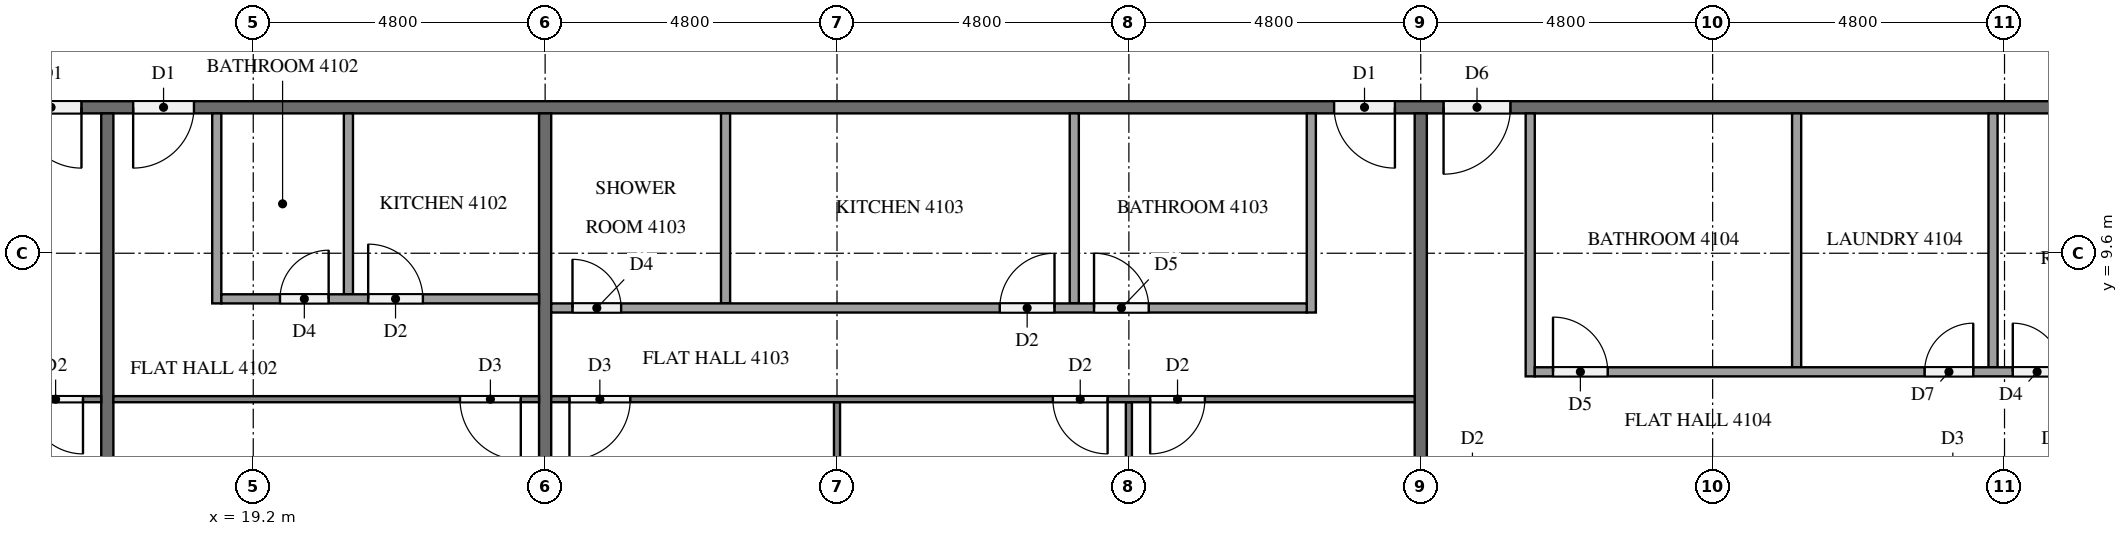
"""IFC4 building model, lengths in metres.
Left out: names, types, materials, properties, quantities, classifications, styles, units other than length and angle.
Written with IfcOpenShell. Run it as: python <this file> out.ifc"""

import sys

from ifc_helpers import new_model, si_unit, direction, frame, frame_2d, origin, place, context, subcontext, project, spatial, rectangle, extrude, element, fill, save


model = new_model("IFC4")
c1 = context("Model", 3, precision=1e-05, world=origin(), true_north=direction((0.0, 1.0)))
c2 = subcontext(c1, "Body", "Model", "MODEL_VIEW")
j1 = project(units=[si_unit("LENGTHUNIT", "METRE"), si_unit("PLANEANGLEUNIT", "RADIAN")], contexts=[c1])
p1 = place(None, origin())
s1 = spatial("IfcSite", under=j1, at=p1, CompositionType="ELEMENT")
p2 = place(p1, origin())
s2 = spatial("IfcBuilding", under=s1, at=p2, CompositionType="ELEMENT")
p3 = place(p2, frame((0.0, 0.0, 159.5)))
s3 = spatial("IfcBuildingStorey", under=s2, at=p3, CompositionType="ELEMENT", Elevation=159.5)
p4 = place(p3, frame((50.5, 12.0, 0.0), z_axis=(0.0, 0.0, 1.0), x_axis=(-1.0, 0.0, 0.0)))
e1 = element("IfcWall", 1, at=p4, inside=s3, PredefinedType="PARTITIONING", context=c2, shape_type="SweptSolid", body=[
    extrude(rectangle(XDim=38.6, YDim=0.2, at=frame_2d((19.3, 0.0))), origin(), (0.0, 0.0, 1.0), 3.2),
])
p5 = place(p4, frame((34.125, 0.0, 0.0)))
e2 = element("IfcOpeningElement", 2, at=p5, cuts=e1, PredefinedType="OPENING", context=c2, shape_type="SweptSolid", body=[
    extrude(rectangle(XDim=1.0, YDim=2.1, at=frame_2d((0.5, 1.05))), frame((0.0, 0.11, 0.0), z_axis=(0.0, -1.0, 0.0), x_axis=(1.0, 0.0, 0.0)), (0.0, 0.0, 1.0), 0.22),
])
p6 = place(p4, frame((32.275, 0.0, 0.0)))
e3 = element("IfcOpeningElement", 3, at=p6, cuts=e1, PredefinedType="OPENING", context=c2, shape_type="SweptSolid", body=[
    extrude(rectangle(XDim=1.0, YDim=2.1, at=frame_2d((0.5, 1.05))), frame((0.0, 0.11, 0.0), z_axis=(0.0, -1.0, 0.0), x_axis=(1.0, 0.0, 0.0)), (0.0, 0.0, 1.0), 0.22),
])
p7 = place(p4, frame((12.525, 0.0, 0.0)))
e4 = element("IfcOpeningElement", 4, at=p7, cuts=e1, PredefinedType="OPENING", context=c2, shape_type="SweptSolid", body=[
    extrude(rectangle(XDim=1.0, YDim=2.1, at=frame_2d((0.5, 1.05))), frame((0.0, 0.11, 0.0), z_axis=(0.0, -1.0, 0.0), x_axis=(1.0, 0.0, 0.0)), (0.0, 0.0, 1.0), 0.22),
])
p8 = place(p4, frame((10.625, 0.0, 0.0)))
e5 = element("IfcOpeningElement", 5, at=p8, cuts=e1, PredefinedType="OPENING", context=c2, shape_type="SweptSolid", body=[
    extrude(rectangle(XDim=1.1, YDim=2.1, at=frame_2d((0.55, 1.05))), frame((0.0, 0.11, 0.0), z_axis=(0.0, -1.0, 0.0), x_axis=(1.0, 0.0, 0.0)), (0.0, 0.0, 1.0), 0.22),
])
p9 = place(p3, frame((16.8, 11.9, 0.0), z_axis=(0.0, 0.0, 1.0), x_axis=(0.0, -1.0, 0.0)))
e6 = element("IfcWall", 6, at=p9, inside=s3, PredefinedType="PARTITIONING", context=c2, shape_type="SweptSolid", body=[
    extrude(rectangle(XDim=11.8, YDim=0.2, at=frame_2d((5.9, 0.0))), origin(), (0.0, 0.0, 1.0), 3.2),
])
p10 = place(p3, frame((24.0, 11.9, 0.0), z_axis=(0.0, 0.0, 1.0), x_axis=(0.0, -1.0, 0.0)))
e7 = element("IfcWall", 7, at=p10, inside=s3, PredefinedType="PARTITIONING", context=c2, shape_type="SweptSolid", body=[
    extrude(rectangle(XDim=11.525, YDim=0.2, at=frame_2d((5.762, 0.0))), origin(), (0.0, 0.0, 1.0), 3.2),
])
p11 = place(p3, frame((38.4, 11.9, 0.0), z_axis=(0.0, 0.0, 1.0), x_axis=(0.0, -1.0, 0.0)))
e8 = element("IfcWall", 8, at=p11, inside=s3, PredefinedType="PARTITIONING", context=c2, shape_type="SweptSolid", body=[
    extrude(rectangle(XDim=11.8, YDim=0.2, at=frame_2d((5.9, 0.0))), origin(), (0.0, 0.0, 1.0), 3.2),
])
p12 = place(p3, frame((16.7, 7.2, 0.0), z_axis=(0.0, 0.0, 1.0), x_axis=(-1.0, 0.0, 0.0)))
e9 = element("IfcWall", 9, at=p12, inside=s3, PredefinedType="PARTITIONING", context=c2, shape_type="SweptSolid", body=[
    extrude(rectangle(XDim=16.6, YDim=0.1, at=frame_2d((8.3, 0.0))), origin(), (0.0, 0.0, 1.0), 3.2),
])
p13 = place(p12, frame((0.3, 0.0, 0.0)))
e10 = element("IfcOpeningElement", 10, at=p13, cuts=e9, PredefinedType="OPENING", context=c2, shape_type="SweptSolid", body=[
    extrude(rectangle(XDim=0.9, YDim=2.1, at=frame_2d((0.45, 1.05))), frame((0.0, 0.06, 0.0), z_axis=(0.0, -1.0, 0.0), x_axis=(1.0, 0.0, 0.0)), (0.0, 0.0, 1.0), 0.12),
])
p14 = place(p12, frame((10.55, 0.0, 0.0)))
e11 = element("IfcOpeningElement", 11, at=p14, cuts=e9, PredefinedType="OPENING", context=c2, shape_type="SweptSolid", body=[
    extrude(rectangle(XDim=1.0, YDim=2.1, at=frame_2d((0.5, 1.05))), frame((0.0, 0.06, 0.0), z_axis=(0.0, -1.0, 0.0), x_axis=(1.0, 0.0, 0.0)), (0.0, 0.0, 1.0), 0.12),
])
p15 = place(p12, frame((12.25, 0.0, 0.0)))
e12 = element("IfcOpeningElement", 12, at=p15, cuts=e9, PredefinedType="OPENING", context=c2, shape_type="SweptSolid", body=[
    extrude(rectangle(XDim=0.9, YDim=2.1, at=frame_2d((0.45, 1.05))), frame((0.0, 0.06, 0.0), z_axis=(0.0, -1.0, 0.0), x_axis=(1.0, 0.0, 0.0)), (0.0, 0.0, 1.0), 0.12),
])
p16 = place(p3, frame((23.9, 7.2, 0.0), z_axis=(0.0, 0.0, 1.0), x_axis=(-1.0, 0.0, 0.0)))
e13 = element("IfcWall", 13, at=p16, inside=s3, PredefinedType="PARTITIONING", context=c2, shape_type="SweptSolid", body=[
    extrude(rectangle(XDim=7.0, YDim=0.1, at=frame_2d((3.5, 0.0))), origin(), (0.0, 0.0, 1.0), 3.2),
])
p17 = place(p16, frame((0.3, 0.0, 0.0)))
e14 = element("IfcOpeningElement", 14, at=p17, cuts=e13, PredefinedType="OPENING", context=c2, shape_type="SweptSolid", body=[
    extrude(rectangle(XDim=1.0, YDim=2.1, at=frame_2d((0.5, 1.05))), frame((0.0, 0.06, 0.0), z_axis=(0.0, -1.0, 0.0), x_axis=(1.0, 0.0, 0.0)), (0.0, 0.0, 1.0), 0.12),
])
p18 = place(p3, frame((20.765, 11.9, 0.0), z_axis=(0.0, 0.0, 1.0), x_axis=(0.0, -1.0, 0.0)))
e15 = element("IfcWall", 15, at=p18, inside=s3, PredefinedType="PARTITIONING", context=c2, shape_type="SweptSolid", body=[
    extrude(rectangle(XDim=2.975, YDim=0.15, at=frame_2d((1.487, 0.0))), origin(), (0.0, 0.0, 1.0), 3.2),
])
p19 = place(p3, frame((18.6, 11.9, 0.0), z_axis=(0.0, 0.0, 1.0), x_axis=(0.0, -1.0, 0.0)))
e16 = element("IfcWall", 16, at=p19, inside=s3, PredefinedType="PARTITIONING", context=c2, shape_type="SweptSolid", body=[
    extrude(rectangle(XDim=3.125, YDim=0.15, at=frame_2d((1.562, 0.0))), origin(), (0.0, 0.0, 1.0), 3.2),
])
p20 = place(p3, frame((18.675, 8.85, 0.0), z_axis=(0.0, 0.0, 1.0), x_axis=(1.0, 0.0, 0.0)))
e17 = element("IfcWall", 17, at=p20, inside=s3, PredefinedType="PARTITIONING", context=c2, shape_type="SweptSolid", body=[
    extrude(rectangle(XDim=5.225, YDim=0.15, at=frame_2d((2.612, 0.0))), origin(), (0.0, 0.0, 1.0), 3.2),
])
p21 = place(p20, frame((0.965, 0.0, 0.0)))
e18 = element("IfcOpeningElement", 18, at=p21, cuts=e17, PredefinedType="OPENING", context=c2, shape_type="SweptSolid", body=[
    extrude(rectangle(XDim=0.8, YDim=2.1, at=frame_2d((0.4, 1.05))), frame((0.0, 0.085, 0.0), z_axis=(0.0, -1.0, 0.0), x_axis=(1.0, 0.0, 0.0)), (0.0, 0.0, 1.0), 0.17),
])
p22 = place(p20, frame((2.415, 0.0, 0.0)))
e19 = element("IfcOpeningElement", 19, at=p22, cuts=e17, PredefinedType="OPENING", context=c2, shape_type="SweptSolid", body=[
    extrude(rectangle(XDim=0.9, YDim=2.1, at=frame_2d((0.45, 1.05))), frame((0.0, 0.085, 0.0), z_axis=(0.0, -1.0, 0.0), x_axis=(1.0, 0.0, 0.0)), (0.0, 0.0, 1.0), 0.17),
])
p23 = place(p3, frame((33.6, 7.15, 0.0), z_axis=(0.0, 0.0, 1.0), x_axis=(0.0, -1.0, 0.0)))
e20 = element("IfcWall", 20, at=p23, inside=s3, PredefinedType="PARTITIONING", context=c2, shape_type="SweptSolid", body=[
    extrude(rectangle(XDim=6.775, YDim=0.1, at=frame_2d((3.387, 0.0))), origin(), (0.0, 0.0, 1.0), 3.2),
])
p24 = place(p3, frame((28.8, 7.15, 0.0), z_axis=(0.0, 0.0, 1.0), x_axis=(0.0, -1.0, 0.0)))
e21 = element("IfcWall", 21, at=p24, inside=s3, PredefinedType="PARTITIONING", context=c2, shape_type="SweptSolid", body=[
    extrude(rectangle(XDim=7.05, YDim=0.1, at=frame_2d((3.525, 0.0))), origin(), (0.0, 0.0, 1.0), 3.2),
])
p25 = place(p3, frame((38.3, 7.2, 0.0), z_axis=(0.0, 0.0, 1.0), x_axis=(-1.0, 0.0, 0.0)))
e22 = element("IfcWall", 22, at=p25, inside=s3, PredefinedType="PARTITIONING", context=c2, shape_type="SweptSolid", body=[
    extrude(rectangle(XDim=14.2, YDim=0.1, at=frame_2d((7.1, 0.0))), origin(), (0.0, 0.0, 1.0), 3.2),
])
p26 = place(p25, frame((3.45, 0.0, 0.0)))
e23 = element("IfcOpeningElement", 23, at=p26, cuts=e22, PredefinedType="OPENING", context=c2, shape_type="SweptSolid", body=[
    extrude(rectangle(XDim=0.9, YDim=2.1, at=frame_2d((0.45, 1.05))), frame((0.0, 0.06, 0.0), z_axis=(0.0, -1.0, 0.0), x_axis=(1.0, 0.0, 0.0)), (0.0, 0.0, 1.0), 0.12),
])
p27 = place(p25, frame((5.05, 0.0, 0.0)))
e24 = element("IfcOpeningElement", 24, at=p27, cuts=e22, PredefinedType="OPENING", context=c2, shape_type="SweptSolid", body=[
    extrude(rectangle(XDim=0.9, YDim=2.1, at=frame_2d((0.45, 1.05))), frame((0.0, 0.06, 0.0), z_axis=(0.0, -1.0, 0.0), x_axis=(1.0, 0.0, 0.0)), (0.0, 0.0, 1.0), 0.12),
])
p28 = place(p25, frame((12.9, 0.0, 0.0)))
e25 = element("IfcOpeningElement", 25, at=p28, cuts=e22, PredefinedType="OPENING", context=c2, shape_type="SweptSolid", body=[
    extrude(rectangle(XDim=1.0, YDim=2.1, at=frame_2d((0.5, 1.05))), frame((0.0, 0.06, 0.0), z_axis=(0.0, -1.0, 0.0), x_axis=(1.0, 0.0, 0.0)), (0.0, 0.0, 1.0), 0.12),
])
for number, where, z_axis, x_axis in (
    (26, (32.702, 11.9, 0.0), (0.0, 0.0, 1.0), (0.0, -1.0, 0.0)),
    (27, (26.967, 11.9, 0.0), (0.0, 0.0, 1.0), (0.0, -1.0, 0.0)),
):
    element("IfcWall", number, at=place(p3, frame(where, z_axis=z_axis, x_axis=x_axis)), inside=s3, PredefinedType="PARTITIONING", context=c2, shape_type="SweptSolid", body=[
        extrude(rectangle(XDim=3.125, YDim=0.15, at=frame_2d((1.562, 0.0))), origin(), (0.0, 0.0, 1.0), 3.2),
    ])
p29 = place(p3, frame((36.6, 11.9, 0.0), z_axis=(0.0, 0.0, 1.0), x_axis=(0.0, -1.0, 0.0)))
e28 = element("IfcWall", 28, at=p29, inside=s3, PredefinedType="PARTITIONING", context=c2, shape_type="SweptSolid", body=[
    extrude(rectangle(XDim=3.275, YDim=0.15, at=frame_2d((1.637, 0.0))), origin(), (0.0, 0.0, 1.0), 3.2),
])
p30 = place(p3, frame((24.1, 8.7, 0.0), z_axis=(0.0, 0.0, 1.0), x_axis=(1.0, 0.0, 0.0)))
e29 = element("IfcWall", 29, at=p30, inside=s3, PredefinedType="PARTITIONING", context=c2, shape_type="SweptSolid", body=[
    extrude(rectangle(XDim=12.425, YDim=0.15, at=frame_2d((6.212, 0.0))), origin(), (0.0, 0.0, 1.0), 3.2),
])
p31 = place(p30, frame((8.927, 0.0, 0.0)))
e30 = element("IfcOpeningElement", 30, at=p31, cuts=e29, PredefinedType="OPENING", context=c2, shape_type="SweptSolid", body=[
    extrude(rectangle(XDim=0.9, YDim=2.1, at=frame_2d((0.45, 1.05))), frame((0.0, 0.085, 0.0), z_axis=(0.0, -1.0, 0.0), x_axis=(1.0, 0.0, 0.0)), (0.0, 0.0, 1.0), 0.17),
])
p32 = place(p30, frame((7.377, 0.0, 0.0)))
e31 = element("IfcOpeningElement", 31, at=p32, cuts=e29, PredefinedType="OPENING", context=c2, shape_type="SweptSolid", body=[
    extrude(rectangle(XDim=0.9, YDim=2.1, at=frame_2d((0.45, 1.05))), frame((0.0, 0.085, 0.0), z_axis=(0.0, -1.0, 0.0), x_axis=(1.0, 0.0, 0.0)), (0.0, 0.0, 1.0), 0.17),
])
p33 = place(p30, frame((0.35, 0.0, 0.0)))
e32 = element("IfcOpeningElement", 32, at=p33, cuts=e29, PredefinedType="OPENING", context=c2, shape_type="SweptSolid", body=[
    extrude(rectangle(XDim=0.8, YDim=2.1, at=frame_2d((0.4, 1.05))), frame((0.0, 0.085, 0.0), z_axis=(0.0, -1.0, 0.0), x_axis=(1.0, 0.0, 0.0)), (0.0, 0.0, 1.0), 0.17),
])
for number, where, z_axis, x_axis in (
    (33, (44.581, 11.9, 0.0), (0.0, 0.0, 1.0), (0.0, -1.0, 0.0)),
    (34, (47.811, 11.9, 0.0), (0.0, 0.0, 1.0), (0.0, -1.0, 0.0)),
):
    element("IfcWall", number, at=place(p3, frame(where, z_axis=z_axis, x_axis=x_axis)), inside=s3, PredefinedType="PARTITIONING", context=c2, shape_type="SweptSolid", body=[
        extrude(rectangle(XDim=4.175, YDim=0.15, at=frame_2d((2.087, 0.0))), origin(), (0.0, 0.0, 1.0), 3.2),
    ])
p34 = place(p3, frame((40.2, 11.9, 0.0), z_axis=(0.0, 0.0, 1.0), x_axis=(0.0, -1.0, 0.0)))
e35 = element("IfcWall", 35, at=p34, inside=s3, PredefinedType="PARTITIONING", context=c2, shape_type="SweptSolid", body=[
    extrude(rectangle(XDim=4.325, YDim=0.15, at=frame_2d((2.163, 0.0))), origin(), (0.0, 0.0, 1.0), 3.2),
])
p35 = place(p3, frame((40.275, 7.65, 0.0), z_axis=(0.0, 0.0, 1.0), x_axis=(1.0, 0.0, 0.0)))
e36 = element("IfcWall", 36, at=p35, inside=s3, PredefinedType="PARTITIONING", context=c2, shape_type="SweptSolid", body=[
    extrude(rectangle(XDim=17.225, YDim=0.15, at=frame_2d((8.613, 0.0))), origin(), (0.0, 0.0, 1.0), 3.2),
])
p36 = place(p35, frame((0.3, 0.0, 0.0)))
e37 = element("IfcOpeningElement", 37, at=p36, cuts=e36, PredefinedType="OPENING", context=c2, shape_type="SweptSolid", body=[
    extrude(rectangle(XDim=0.9, YDim=2.1, at=frame_2d((0.45, 1.05))), frame((0.0, 0.085, 0.0), z_axis=(0.0, -1.0, 0.0), x_axis=(1.0, 0.0, 0.0)), (0.0, 0.0, 1.0), 0.17),
])
p37 = place(p35, frame((6.411, 0.0, 0.0)))
e38 = element("IfcOpeningElement", 38, at=p37, cuts=e36, PredefinedType="OPENING", context=c2, shape_type="SweptSolid", body=[
    extrude(rectangle(XDim=0.8, YDim=2.1, at=frame_2d((0.4, 1.05))), frame((0.0, 0.085, 0.0), z_axis=(0.0, -1.0, 0.0), x_axis=(1.0, 0.0, 0.0)), (0.0, 0.0, 1.0), 0.17),
])
p38 = place(p35, frame((7.861, 0.0, 0.0)))
e39 = element("IfcOpeningElement", 39, at=p38, cuts=e36, PredefinedType="OPENING", context=c2, shape_type="SweptSolid", body=[
    extrude(rectangle(XDim=0.8, YDim=2.1, at=frame_2d((0.4, 1.05))), frame((0.0, 0.085, 0.0), z_axis=(0.0, -1.0, 0.0), x_axis=(1.0, 0.0, 0.0)), (0.0, 0.0, 1.0), 0.17),
])
p39 = place(p35, frame((15.975, 0.0, 0.0)))
e40 = element("IfcOpeningElement", 40, at=p39, cuts=e36, PredefinedType="OPENING", context=c2, shape_type="SweptSolid", body=[
    extrude(rectangle(XDim=0.9, YDim=2.1, at=frame_2d((0.45, 1.05))), frame((0.0, 0.085, 0.0), z_axis=(0.0, -1.0, 0.0), x_axis=(1.0, 0.0, 0.0)), (0.0, 0.0, 1.0), 0.17),
])
p40 = place(p5, origin())
e41 = element("IfcDoor", 41, at=p40, inside=s3, OperationType="SINGLE_SWING_LEFT", PredefinedType="DOOR", context=c2, shape_type="SweptSolid", body=[
    extrude(rectangle(XDim=1.0, YDim=2.1, at=frame_2d((0.5, 1.05))), frame((0.0, 0.025, 0.0), z_axis=(0.0, -1.0, 0.0), x_axis=(1.0, 0.0, 0.0)), (0.0, 0.0, 1.0), 0.05),
])
fill(e2, e41)
p41 = place(p6, origin())
e42 = element("IfcDoor", 42, at=p41, inside=s3, OperationType="SINGLE_SWING_RIGHT", PredefinedType="DOOR", context=c2, shape_type="SweptSolid", body=[
    extrude(rectangle(XDim=1.0, YDim=2.1, at=frame_2d((0.5, 1.05))), frame((0.0, 0.025, 0.0), z_axis=(0.0, -1.0, 0.0), x_axis=(1.0, 0.0, 0.0)), (0.0, 0.0, 1.0), 0.05),
])
fill(e3, e42)
p42 = place(p7, origin())
e43 = element("IfcDoor", 43, at=p42, inside=s3, OperationType="SINGLE_SWING_LEFT", PredefinedType="DOOR", context=c2, shape_type="SweptSolid", body=[
    extrude(rectangle(XDim=1.0, YDim=2.1, at=frame_2d((0.5, 1.05))), frame((0.0, 0.025, 0.0), z_axis=(0.0, -1.0, 0.0), x_axis=(1.0, 0.0, 0.0)), (0.0, 0.0, 1.0), 0.05),
])
fill(e4, e43)
p43 = place(p8, origin())
e44 = element("IfcDoor", 44, at=p43, inside=s3, OperationType="SINGLE_SWING_RIGHT", PredefinedType="DOOR", context=c2, shape_type="SweptSolid", body=[
    extrude(rectangle(XDim=1.1, YDim=2.1, at=frame_2d((0.55, 1.05))), frame((0.0, 0.025, 0.0), z_axis=(0.0, -1.0, 0.0), x_axis=(1.0, 0.0, 0.0)), (0.0, 0.0, 1.0), 0.05),
])
fill(e5, e44)
p44 = place(p13, origin())
e45 = element("IfcDoor", 45, at=p44, inside=s3, OperationType="SINGLE_SWING_LEFT", PredefinedType="DOOR", context=c2, shape_type="SweptSolid", body=[
    extrude(rectangle(XDim=0.9, YDim=2.1, at=frame_2d((0.45, 1.05))), frame((0.0, 0.025, 0.0), z_axis=(0.0, -1.0, 0.0), x_axis=(1.0, 0.0, 0.0)), (0.0, 0.0, 1.0), 0.05),
])
fill(e10, e45)
p45 = place(p17, origin())
e46 = element("IfcDoor", 46, at=p45, inside=s3, OperationType="SINGLE_SWING_LEFT", PredefinedType="DOOR", context=c2, shape_type="SweptSolid", body=[
    extrude(rectangle(XDim=1.0, YDim=2.1, at=frame_2d((0.5, 1.05))), frame((0.0, 0.025, 0.0), z_axis=(0.0, -1.0, 0.0), x_axis=(1.0, 0.0, 0.0)), (0.0, 0.0, 1.0), 0.05),
])
fill(e14, e46)
p46 = place(p21, origin())
e47 = element("IfcDoor", 47, at=p46, inside=s3, OperationType="SINGLE_SWING_RIGHT", PredefinedType="DOOR", context=c2, shape_type="SweptSolid", body=[
    extrude(rectangle(XDim=0.8, YDim=2.1, at=frame_2d((0.4, 1.05))), frame((0.0, 0.025, 0.0), z_axis=(0.0, -1.0, 0.0), x_axis=(1.0, 0.0, 0.0)), (0.0, 0.0, 1.0), 0.05),
])
fill(e18, e47)
p47 = place(p22, origin())
e48 = element("IfcDoor", 48, at=p47, inside=s3, OperationType="SINGLE_SWING_LEFT", PredefinedType="DOOR", context=c2, shape_type="SweptSolid", body=[
    extrude(rectangle(XDim=0.9, YDim=2.1, at=frame_2d((0.45, 1.05))), frame((0.0, 0.025, 0.0), z_axis=(0.0, -1.0, 0.0), x_axis=(1.0, 0.0, 0.0)), (0.0, 0.0, 1.0), 0.05),
])
fill(e19, e48)
p48 = place(p26, origin())
e49 = element("IfcDoor", 49, at=p48, inside=s3, OperationType="SINGLE_SWING_RIGHT", PredefinedType="DOOR", context=c2, shape_type="SweptSolid", body=[
    extrude(rectangle(XDim=0.9, YDim=2.1, at=frame_2d((0.45, 1.05))), frame((0.0, 0.025, 0.0), z_axis=(0.0, -1.0, 0.0), x_axis=(1.0, 0.0, 0.0)), (0.0, 0.0, 1.0), 0.05),
])
fill(e23, e49)
p49 = place(p27, origin())
e50 = element("IfcDoor", 50, at=p49, inside=s3, OperationType="SINGLE_SWING_LEFT", PredefinedType="DOOR", context=c2, shape_type="SweptSolid", body=[
    extrude(rectangle(XDim=0.9, YDim=2.1, at=frame_2d((0.45, 1.05))), frame((0.0, 0.025, 0.0), z_axis=(0.0, -1.0, 0.0), x_axis=(1.0, 0.0, 0.0)), (0.0, 0.0, 1.0), 0.05),
])
fill(e24, e50)
p50 = place(p28, origin())
e51 = element("IfcDoor", 51, at=p50, inside=s3, OperationType="SINGLE_SWING_RIGHT", PredefinedType="DOOR", context=c2, shape_type="SweptSolid", body=[
    extrude(rectangle(XDim=1.0, YDim=2.1, at=frame_2d((0.5, 1.05))), frame((0.0, 0.025, 0.0), z_axis=(0.0, -1.0, 0.0), x_axis=(1.0, 0.0, 0.0)), (0.0, 0.0, 1.0), 0.05),
])
fill(e25, e51)
p51 = place(p31, origin())
e52 = element("IfcDoor", 52, at=p51, inside=s3, OperationType="SINGLE_SWING_LEFT", PredefinedType="DOOR", context=c2, shape_type="SweptSolid", body=[
    extrude(rectangle(XDim=0.9, YDim=2.1, at=frame_2d((0.45, 1.05))), frame((0.0, 0.025, 0.0), z_axis=(0.0, -1.0, 0.0), x_axis=(1.0, 0.0, 0.0)), (0.0, 0.0, 1.0), 0.05),
])
fill(e30, e52)
p52 = place(p32, origin())
e53 = element("IfcDoor", 53, at=p52, inside=s3, OperationType="SINGLE_SWING_RIGHT", PredefinedType="DOOR", context=c2, shape_type="SweptSolid", body=[
    extrude(rectangle(XDim=0.9, YDim=2.1, at=frame_2d((0.45, 1.05))), frame((0.0, 0.025, 0.0), z_axis=(0.0, -1.0, 0.0), x_axis=(1.0, 0.0, 0.0)), (0.0, 0.0, 1.0), 0.05),
])
fill(e31, e53)
p53 = place(p33, origin())
e54 = element("IfcDoor", 54, at=p53, inside=s3, OperationType="SINGLE_SWING_LEFT", PredefinedType="DOOR", context=c2, shape_type="SweptSolid", body=[
    extrude(rectangle(XDim=0.8, YDim=2.1, at=frame_2d((0.4, 1.05))), frame((0.0, 0.025, 0.0), z_axis=(0.0, -1.0, 0.0), x_axis=(1.0, 0.0, 0.0)), (0.0, 0.0, 1.0), 0.05),
])
fill(e32, e54)
p54 = place(p36, origin())
e55 = element("IfcDoor", 55, at=p54, inside=s3, OperationType="SINGLE_SWING_LEFT", PredefinedType="DOOR", context=c2, shape_type="SweptSolid", body=[
    extrude(rectangle(XDim=0.9, YDim=2.1, at=frame_2d((0.45, 1.05))), frame((0.0, 0.025, 0.0), z_axis=(0.0, -1.0, 0.0), x_axis=(1.0, 0.0, 0.0)), (0.0, 0.0, 1.0), 0.05),
])
fill(e37, e55)
p55 = place(p37, origin())
e56 = element("IfcDoor", 56, at=p55, inside=s3, OperationType="SINGLE_SWING_RIGHT", PredefinedType="DOOR", context=c2, shape_type="SweptSolid", body=[
    extrude(rectangle(XDim=0.8, YDim=2.1, at=frame_2d((0.4, 1.05))), frame((0.0, 0.025, 0.0), z_axis=(0.0, -1.0, 0.0), x_axis=(1.0, 0.0, 0.0)), (0.0, 0.0, 1.0), 0.05),
])
fill(e38, e56)
p56 = place(p38, origin())
e57 = element("IfcDoor", 57, at=p56, inside=s3, OperationType="SINGLE_SWING_LEFT", PredefinedType="DOOR", context=c2, shape_type="SweptSolid", body=[
    extrude(rectangle(XDim=0.8, YDim=2.1, at=frame_2d((0.4, 1.05))), frame((0.0, 0.025, 0.0), z_axis=(0.0, -1.0, 0.0), x_axis=(1.0, 0.0, 0.0)), (0.0, 0.0, 1.0), 0.05),
])
fill(e39, e57)
save(model, sys.argv[1])
